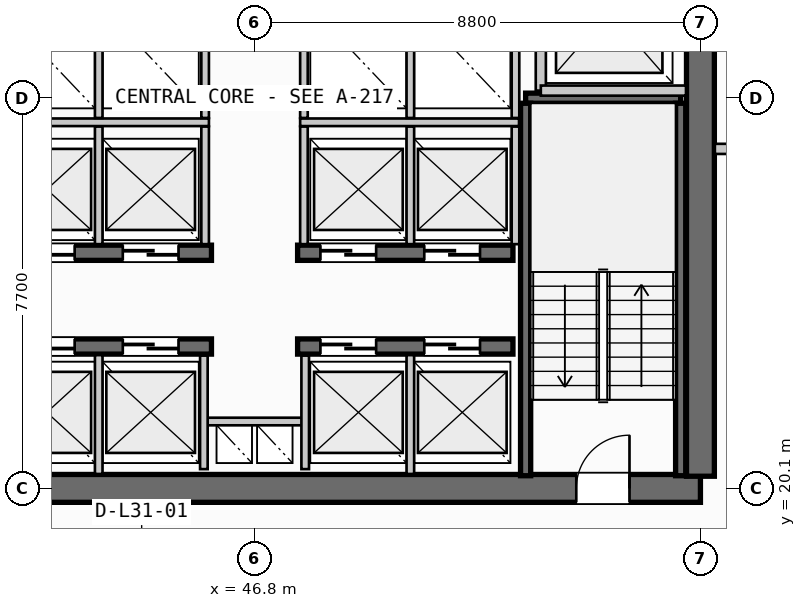
"""IFC4 building model, lengths in metres.
Left out: names, types, materials, properties, quantities, classifications, styles, units other than length and angle.
Written with IfcOpenShell. Run it as: python <this file> out.ifc"""

import sys

from ifc_helpers import new_model, si_unit, direction, frame, frame_2d, origin, place, context, subcontext, project, spatial, rectangle, extrude, source, transform, mapped, element, fill, save


model = new_model("IFC4")
c1 = context("Model", 3, precision=1e-05, world=origin(), true_north=direction((0.0, 1.0)))
c2 = subcontext(c1, "Body", "Model", "MODEL_VIEW")
j1 = project(units=[si_unit("LENGTHUNIT", "METRE"), si_unit("PLANEANGLEUNIT", "RADIAN")], contexts=[c1])
p1 = place(None, origin())
s1 = spatial("IfcSite", under=j1, at=p1, CompositionType="ELEMENT")
p2 = place(p1, origin())
s2 = spatial("IfcBuilding", under=s1, at=p2, CompositionType="ELEMENT")
p3 = place(p2, frame((0.0, 0.0, 125.2)))
s3 = spatial("IfcBuildingStorey", under=s2, at=p3, CompositionType="ELEMENT", Elevation=125.2)
p4 = place(p3, frame((38.0, 20.1, 0.0), z_axis=(0.0, 0.0, 1.0), x_axis=(1.0, 0.0, 0.0)))
e1 = element("IfcWall", 1, at=p4, inside=s3, PredefinedType="SHEAR", context=c2, shape_type="SweptSolid", body=[
    extrude(rectangle(XDim=17.6, YDim=0.55, at=frame_2d((8.8, 0.0))), origin(), (0.0, 0.0, 1.0), 3.35),
])
p5 = place(p4, frame((1.4, 0.0, 0.0)))
e2 = element("IfcOpeningElement", 2, at=p5, cuts=e1, PredefinedType="OPENING", context=c2, shape_type="SweptSolid", body=[
    extrude(rectangle(XDim=1.05, YDim=2.15, at=frame_2d((0.525, 1.075))), frame((0.0, 0.285, 0.0), z_axis=(0.0, -1.0, 0.0), x_axis=(1.0, 0.0, 0.0)), (0.0, 0.0, 1.0), 0.57),
])
p6 = place(p4, frame((15.15, 0.0, 0.0)))
e3 = element("IfcOpeningElement", 3, at=p6, cuts=e1, PredefinedType="OPENING", context=c2, shape_type="SweptSolid", body=[
    extrude(rectangle(XDim=1.05, YDim=2.15, at=frame_2d((0.525, 1.075))), frame((0.0, 0.285, 0.0), z_axis=(0.0, -1.0, 0.0), x_axis=(1.0, 0.0, 0.0)), (0.0, 0.0, 1.0), 0.57),
])
p7 = place(p3, frame((55.6, 20.34, 0.0), z_axis=(0.0, 0.0, 1.0), x_axis=(0.0, 1.0, 0.0)))
e4 = element("IfcWall", 4, at=p7, inside=s3, PredefinedType="SHEAR", context=c2, shape_type="SweptSolid", body=[
    extrude(rectangle(XDim=14.92, YDim=0.55, at=frame_2d((7.46, 0.0))), origin(), (0.0, 0.0, 1.0), 3.35),
])
p8 = place(p7, frame((12.71, 0.0, 0.0)))
e5 = element("IfcOpeningElement", 5, at=p8, cuts=e4, PredefinedType="OPENING", context=c2, shape_type="SweptSolid", body=[
    extrude(rectangle(XDim=1.05, YDim=2.15, at=frame_2d((0.525, 1.075))), frame((0.0, 0.285, 0.0), z_axis=(0.0, -1.0, 0.0), x_axis=(1.0, 0.0, 0.0)), (0.0, 0.0, 1.0), 0.57),
])
p9 = place(p7, frame((8.61, 0.0, 0.0)))
e6 = element("IfcOpeningElement", 6, at=p9, cuts=e4, PredefinedType="OPENING", context=c2, shape_type="SweptSolid", body=[
    extrude(rectangle(XDim=1.1, YDim=2.2, at=frame_2d((0.55, 1.1))), frame((0.0, 0.285, 0.0), z_axis=(0.0, -1.0, 0.0), x_axis=(1.0, 0.0, 0.0)), (0.0, 0.0, 1.0), 0.57),
])
p10 = place(p3, frame((41.7, 22.9, 0.0), z_axis=(0.0, 0.0, 1.0), x_axis=(1.0, 0.0, 0.0)))
e7 = element("IfcWall", 7, at=p10, inside=s3, PredefinedType="SHEAR", context=c2, shape_type="SweptSolid", body=[
    extrude(rectangle(XDim=4.25, YDim=0.3, at=frame_2d((2.125, 0.0))), origin(), (0.0, 0.0, 1.0), 3.35),
])
p11 = place(p10, frame((0.45, 0.0, 0.0)))
e8 = element("IfcOpeningElement", 8, at=p11, cuts=e7, PredefinedType="OPENING", context=c2, shape_type="SweptSolid", body=[
    extrude(rectangle(XDim=1.1, YDim=2.2, at=frame_2d((0.55, 1.1))), frame((0.0, 0.16, 0.0), z_axis=(0.0, -1.0, 0.0), x_axis=(1.0, 0.0, 0.0)), (0.0, 0.0, 1.0), 0.32),
])
p12 = place(p10, frame((2.5, 0.0, 0.0)))
e9 = element("IfcOpeningElement", 9, at=p12, cuts=e7, PredefinedType="OPENING", context=c2, shape_type="SweptSolid", body=[
    extrude(rectangle(XDim=1.1, YDim=2.2, at=frame_2d((0.55, 1.1))), frame((0.0, 0.16, 0.0), z_axis=(0.0, -1.0, 0.0), x_axis=(1.0, 0.0, 0.0)), (0.0, 0.0, 1.0), 0.32),
])
p13 = place(p3, frame((47.65, 22.9, 0.0), z_axis=(0.0, 0.0, 1.0), x_axis=(1.0, 0.0, 0.0)))
e10 = element("IfcWall", 10, at=p13, inside=s3, PredefinedType="SHEAR", context=c2, shape_type="SweptSolid", body=[
    extrude(rectangle(XDim=4.25, YDim=0.3, at=frame_2d((2.125, 0.0))), origin(), (0.0, 0.0, 1.0), 3.35),
])
p14 = place(p13, frame((0.45, 0.0, 0.0)))
e11 = element("IfcOpeningElement", 11, at=p14, cuts=e10, PredefinedType="OPENING", context=c2, shape_type="SweptSolid", body=[
    extrude(rectangle(XDim=1.1, YDim=2.2, at=frame_2d((0.55, 1.1))), frame((0.0, 0.16, 0.0), z_axis=(0.0, -1.0, 0.0), x_axis=(1.0, 0.0, 0.0)), (0.0, 0.0, 1.0), 0.32),
])
p15 = place(p13, frame((2.5, 0.0, 0.0)))
e12 = element("IfcOpeningElement", 12, at=p15, cuts=e10, PredefinedType="OPENING", context=c2, shape_type="SweptSolid", body=[
    extrude(rectangle(XDim=1.1, YDim=2.2, at=frame_2d((0.55, 1.1))), frame((0.0, 0.16, 0.0), z_axis=(0.0, -1.0, 0.0), x_axis=(1.0, 0.0, 0.0)), (0.0, 0.0, 1.0), 0.32),
])
p16 = place(p3, frame((41.7, 24.75, 0.0), z_axis=(0.0, 0.0, 1.0), x_axis=(1.0, 0.0, 0.0)))
e13 = element("IfcWall", 13, at=p16, inside=s3, PredefinedType="SHEAR", context=c2, shape_type="SweptSolid", body=[
    extrude(rectangle(XDim=4.25, YDim=0.3, at=frame_2d((2.125, 0.0))), origin(), (0.0, 0.0, 1.0), 3.35),
])
p17 = place(p16, frame((0.45, 0.0, 0.0)))
e14 = element("IfcOpeningElement", 14, at=p17, cuts=e13, PredefinedType="OPENING", context=c2, shape_type="SweptSolid", body=[
    extrude(rectangle(XDim=1.1, YDim=2.2, at=frame_2d((0.55, 1.1))), frame((0.0, 0.16, 0.0), z_axis=(0.0, -1.0, 0.0), x_axis=(1.0, 0.0, 0.0)), (0.0, 0.0, 1.0), 0.32),
])
p18 = place(p16, frame((2.5, 0.0, 0.0)))
e15 = element("IfcOpeningElement", 15, at=p18, cuts=e13, PredefinedType="OPENING", context=c2, shape_type="SweptSolid", body=[
    extrude(rectangle(XDim=1.1, YDim=2.2, at=frame_2d((0.55, 1.1))), frame((0.0, 0.16, 0.0), z_axis=(0.0, -1.0, 0.0), x_axis=(1.0, 0.0, 0.0)), (0.0, 0.0, 1.0), 0.32),
])
p19 = place(p3, frame((47.65, 24.75, 0.0), z_axis=(0.0, 0.0, 1.0), x_axis=(1.0, 0.0, 0.0)))
e16 = element("IfcWall", 16, at=p19, inside=s3, PredefinedType="SHEAR", context=c2, shape_type="SweptSolid", body=[
    extrude(rectangle(XDim=4.25, YDim=0.3, at=frame_2d((2.125, 0.0))), origin(), (0.0, 0.0, 1.0), 3.35),
])
p20 = place(p19, frame((0.45, 0.0, 0.0)))
e17 = element("IfcOpeningElement", 17, at=p20, cuts=e16, PredefinedType="OPENING", context=c2, shape_type="SweptSolid", body=[
    extrude(rectangle(XDim=1.1, YDim=2.2, at=frame_2d((0.55, 1.1))), frame((0.0, 0.16, 0.0), z_axis=(0.0, -1.0, 0.0), x_axis=(1.0, 0.0, 0.0)), (0.0, 0.0, 1.0), 0.32),
])
p21 = place(p19, frame((2.5, 0.0, 0.0)))
e18 = element("IfcOpeningElement", 18, at=p21, cuts=e16, PredefinedType="OPENING", context=c2, shape_type="SweptSolid", body=[
    extrude(rectangle(XDim=1.1, YDim=2.2, at=frame_2d((0.55, 1.1))), frame((0.0, 0.16, 0.0), z_axis=(0.0, -1.0, 0.0), x_axis=(1.0, 0.0, 0.0)), (0.0, 0.0, 1.0), 0.32),
])
p22 = place(p3, frame((52.15, 27.8, 0.0), z_axis=(0.0, 0.0, 1.0), x_axis=(1.0, 0.0, 0.0)))
e19 = element("IfcWall", 19, at=p22, inside=s3, PredefinedType="SHEAR", context=c2, shape_type="SweptSolid", body=[
    extrude(rectangle(XDim=3.06, YDim=0.2, at=frame_2d((1.53, 0.0))), origin(), (0.0, 0.0, 1.0), 3.35),
])
for number, where, z_axis, x_axis in (
    (20, (55.21, 27.7, 0.0), (0.0, 0.0, 1.0), (0.0, -1.0, 0.0)),
    (21, (52.15, 20.35, 0.0), (0.0, 0.0, 1.0), (0.0, 1.0, 0.0)),
):
    element("IfcWall", number, at=place(p3, frame(where, z_axis=z_axis, x_axis=x_axis)), inside=s3, PredefinedType="SHEAR", context=c2, shape_type="SweptSolid", body=[
        extrude(rectangle(XDim=7.35, YDim=0.2, at=frame_2d((3.675, 0.0))), origin(), (0.0, 0.0, 1.0), 3.35),
    ])
p23 = place(p3, frame((45.8, 21.42, 0.0), z_axis=(0.0, 0.0, 1.0), x_axis=(1.0, 0.0, 0.0)))
e22 = element("IfcWall", 22, at=p23, inside=s3, PredefinedType="PARTITIONING", context=c2, shape_type="SweptSolid", body=[
    extrude(rectangle(XDim=2.0, YDim=0.15, at=frame_2d((1.0, 0.0))), origin(), (0.0, 0.0, 1.0), 2.635),
])
for number, where, z_axis, x_axis in (
    (23, (45.8, 20.48, 0.0), (0.0, 0.0, 1.0), (0.0, 1.0, 0.0)),
    (24, (47.8, 20.48, 0.0), (0.0, 0.0, 1.0), (0.0, 1.0, 0.0)),
):
    element("IfcWall", number, at=place(p3, frame(where, z_axis=z_axis, x_axis=x_axis)), inside=s3, PredefinedType="PARTITIONING", context=c2, shape_type="SweptSolid", body=[
        extrude(rectangle(XDim=2.24, YDim=0.15, at=frame_2d((1.12, 0.0))), origin(), (0.0, 0.0, 1.0), 2.635),
    ])
p24 = place(p3, frame((52.45, 27.95, 0.0), z_axis=(0.0, 0.0, 1.0), x_axis=(0.0, 1.0, 0.0)))
e25 = element("IfcWall", 25, at=p24, inside=s3, PredefinedType="PARTITIONING", context=c2, shape_type="SweptSolid", body=[
    extrude(rectangle(XDim=3.1, YDim=0.2, at=frame_2d((1.55, 0.0))), origin(), (0.0, 0.0, 1.0), 2.635),
])
p25 = place(p3, frame((52.45, 27.95, 0.0), z_axis=(0.0, 0.0, 1.0), x_axis=(1.0, 0.0, 0.0)))
e26 = element("IfcWall", 26, at=p25, inside=s3, PredefinedType="PARTITIONING", context=c2, shape_type="SweptSolid", body=[
    extrude(rectangle(XDim=2.865, YDim=0.2, at=frame_2d((1.433, 0.0))), origin(), (0.0, 0.0, 1.0), 2.635),
])
p26 = place(p3, frame((55.885, 26.8, 0.0), z_axis=(0.0, 0.0, 1.0), x_axis=(1.0, 0.0, 0.0)))
e27 = element("IfcWall", 27, at=p26, inside=s3, PredefinedType="PARTITIONING", context=c2, shape_type="SweptSolid", body=[
    extrude(rectangle(XDim=3.215, YDim=0.2, at=frame_2d((1.607, 0.0))), origin(), (0.0, 0.0, 1.0), 2.635),
])
for number, where, z_axis, x_axis in (
    (28, (43.725, 20.385, 0.0), (0.0, 0.0, 1.0), (0.0, 1.0, 0.0)),
    (29, (49.875, 20.385, 0.0), (0.0, 0.0, 1.0), (0.0, 1.0, 0.0)),
):
    element("IfcWall", number, at=place(p3, frame(where, z_axis=z_axis, x_axis=x_axis)), inside=s3, PredefinedType="PARTITIONING", context=c2, shape_type="SweptSolid", body=[
        extrude(rectangle(XDim=2.345, YDim=0.15, at=frame_2d((1.172, 0.0))), origin(), (0.0, 0.0, 1.0), 2.635),
    ])
p27 = place(p3, frame((41.58, 27.325, 0.0), z_axis=(0.0, 0.0, 1.0), x_axis=(1.0, 0.0, 0.0)))
e30 = element("IfcWall", 30, at=p27, inside=s3, PredefinedType="PARTITIONING", context=c2, shape_type="SweptSolid", body=[
    extrude(rectangle(XDim=4.32, YDim=0.15, at=frame_2d((2.16, 0.0))), origin(), (0.0, 0.0, 1.0), 2.635),
])
p28 = place(p3, frame((47.7, 27.325, 0.0), z_axis=(0.0, 0.0, 1.0), x_axis=(1.0, 0.0, 0.0)))
e31 = element("IfcWall", 31, at=p28, inside=s3, PredefinedType="PARTITIONING", context=c2, shape_type="SweptSolid", body=[
    extrude(rectangle(XDim=4.32, YDim=0.15, at=frame_2d((2.16, 0.0))), origin(), (0.0, 0.0, 1.0), 2.635),
])
for number, where, z_axis, x_axis in (
    (32, (43.725, 24.92, 0.0), (0.0, 0.0, 1.0), (0.0, 1.0, 0.0)),
    (33, (45.825, 24.92, 0.0), (0.0, 0.0, 1.0), (0.0, 1.0, 0.0)),
    (34, (47.775, 24.92, 0.0), (0.0, 0.0, 1.0), (0.0, 1.0, 0.0)),
    (35, (49.875, 24.92, 0.0), (0.0, 0.0, 1.0), (0.0, 1.0, 0.0)),
    (36, (51.95, 24.92, 0.0), (0.0, 0.0, 1.0), (0.0, 1.0, 0.0)),
):
    element("IfcWall", number, at=place(p3, frame(where, z_axis=z_axis, x_axis=x_axis)), inside=s3, PredefinedType="PARTITIONING", context=c2, shape_type="SweptSolid", body=[
        extrude(rectangle(XDim=2.32, YDim=0.15, at=frame_2d((1.16, 0.0))), origin(), (0.0, 0.0, 1.0), 2.635),
    ])
for number, where, z_axis, x_axis in (
    (37, (43.725, 27.41, 0.0), (0.0, 0.0, 1.0), (0.0, 1.0, 0.0)),
    (38, (45.825, 27.41, 0.0), (0.0, 0.0, 1.0), (0.0, 1.0, 0.0)),
    (39, (47.775, 27.41, 0.0), (0.0, 0.0, 1.0), (0.0, 1.0, 0.0)),
    (40, (49.875, 27.41, 0.0), (0.0, 0.0, 1.0), (0.0, 1.0, 0.0)),
    (41, (51.95, 27.41, 0.0), (0.0, 0.0, 1.0), (0.0, 1.0, 0.0)),
):
    element("IfcWall", number, at=place(p3, frame(where, z_axis=z_axis, x_axis=x_axis)), inside=s3, PredefinedType="PARTITIONING", context=c2, shape_type="SweptSolid", body=[
        extrude(rectangle(XDim=2.27, YDim=0.15, at=frame_2d((1.135, 0.0))), origin(), (0.0, 0.0, 1.0), 2.635),
    ])
m1 = source(origin(), c2, "Body", "SweptSolid", [
    extrude(rectangle(XDim=1.05, YDim=2.15, at=frame_2d((0.525, 1.075))), frame((0.0, 0.025, 0.0), z_axis=(0.0, -1.0, 0.0), x_axis=(1.0, 0.0, 0.0)), (0.0, 0.0, 1.0), 0.05),
])
p29 = place(p6, origin())
e42 = element("IfcDoor", 42, at=p29, inside=s3, OperationType="SINGLE_SWING_RIGHT", PredefinedType="DOOR", context=c2, shape_type="MappedRepresentation", body=[
    mapped(m1, transform((0.0, 0.0, 0.0), scale=1.0)),
])
fill(e3, e42)
m2 = source(origin(), c2, "Body", "SweptSolid", [
    extrude(rectangle(XDim=1.1, YDim=2.2, at=frame_2d((0.55, 1.1))), frame((0.0, 0.025, 0.0), z_axis=(0.0, -1.0, 0.0), x_axis=(1.0, 0.0, 0.0)), (0.0, 0.0, 1.0), 0.05),
])
p30 = place(p11, origin())
e43 = element("IfcDoor", 43, at=p30, inside=s3, OperationType="SLIDING_TO_LEFT", PredefinedType="DOOR", context=c2, shape_type="MappedRepresentation", body=[
    mapped(m2, transform((0.0, 0.0, 0.0), scale=1.0)),
])
fill(e8, e43)
p31 = place(p12, origin())
e44 = element("IfcDoor", 44, at=p31, inside=s3, OperationType="SLIDING_TO_LEFT", PredefinedType="DOOR", context=c2, shape_type="MappedRepresentation", body=[
    mapped(m2, transform((0.0, 0.0, 0.0), scale=1.0)),
])
fill(e9, e44)
p32 = place(p14, origin())
e45 = element("IfcDoor", 45, at=p32, inside=s3, OperationType="SLIDING_TO_LEFT", PredefinedType="DOOR", context=c2, shape_type="MappedRepresentation", body=[
    mapped(m2, transform((0.0, 0.0, 0.0), scale=1.0)),
])
fill(e11, e45)
p33 = place(p15, origin())
e46 = element("IfcDoor", 46, at=p33, inside=s3, OperationType="SLIDING_TO_LEFT", PredefinedType="DOOR", context=c2, shape_type="MappedRepresentation", body=[
    mapped(m2, transform((0.0, 0.0, 0.0), scale=1.0)),
])
fill(e12, e46)
p34 = place(p17, origin())
e47 = element("IfcDoor", 47, at=p34, inside=s3, OperationType="SLIDING_TO_RIGHT", PredefinedType="DOOR", context=c2, shape_type="MappedRepresentation", body=[
    mapped(m2, transform((0.0, 0.0, 0.0), scale=1.0)),
])
fill(e14, e47)
p35 = place(p18, origin())
e48 = element("IfcDoor", 48, at=p35, inside=s3, OperationType="SLIDING_TO_RIGHT", PredefinedType="DOOR", context=c2, shape_type="MappedRepresentation", body=[
    mapped(m2, transform((0.0, 0.0, 0.0), scale=1.0)),
])
fill(e15, e48)
p36 = place(p20, origin())
e49 = element("IfcDoor", 49, at=p36, inside=s3, OperationType="SLIDING_TO_RIGHT", PredefinedType="DOOR", context=c2, shape_type="MappedRepresentation", body=[
    mapped(m2, transform((0.0, 0.0, 0.0), scale=1.0)),
])
fill(e17, e49)
p37 = place(p21, origin())
e50 = element("IfcDoor", 50, at=p37, inside=s3, OperationType="SLIDING_TO_RIGHT", PredefinedType="DOOR", context=c2, shape_type="MappedRepresentation", body=[
    mapped(m2, transform((0.0, 0.0, 0.0), scale=1.0)),
])
fill(e18, e50)
save(model, sys.argv[1])
